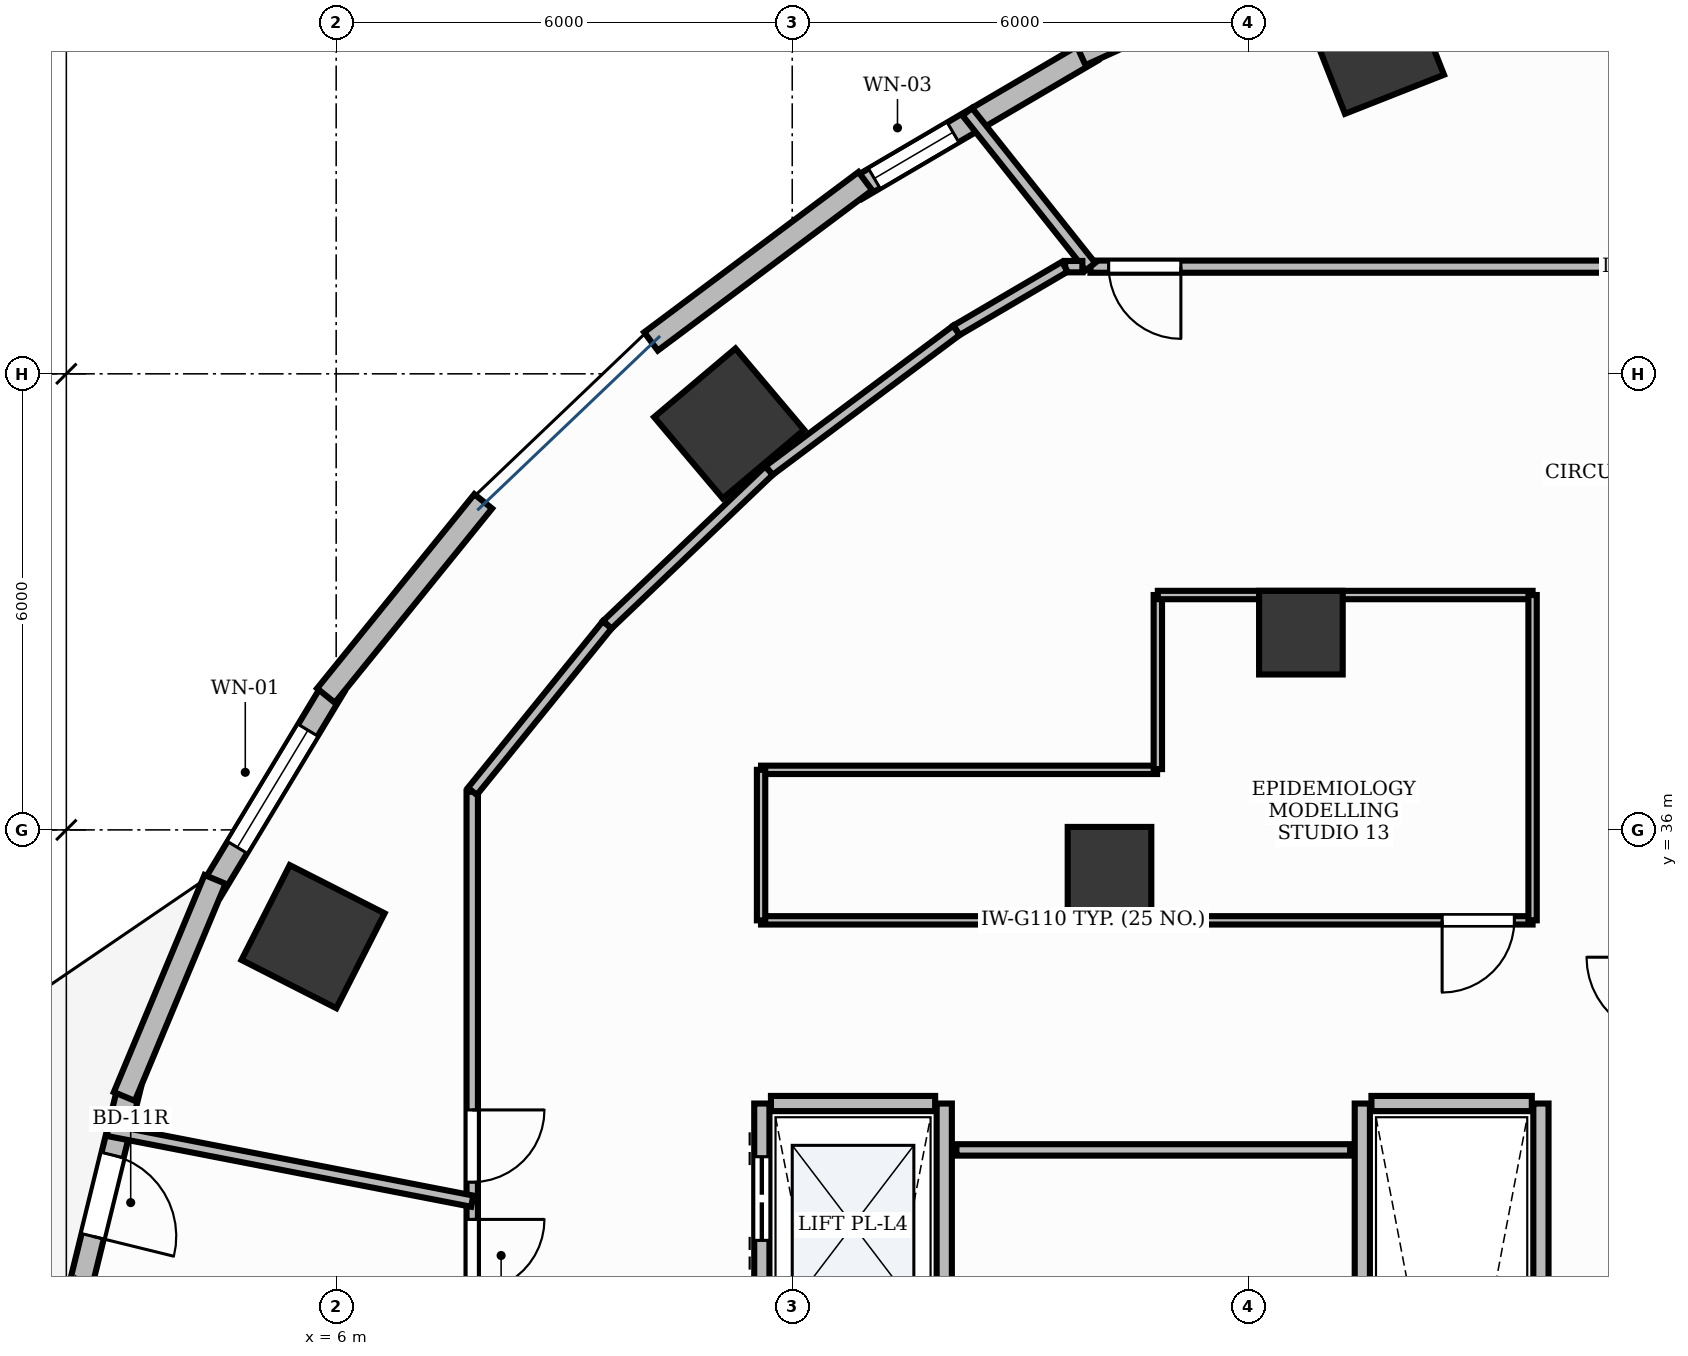
"""IFC4 building model, lengths in metres.
Left out: names, types, materials, properties, quantities, classifications, styles, units other than length and angle.
Written with IfcOpenShell. Run it as: python <this file> out.ifc"""

import sys

from ifc_helpers import new_model, si_unit, direction, frame, frame_2d, origin, origin_2d, place, context, subcontext, project, spatial, rectangle, extrude, element, fill, save


model = new_model("IFC4")
c1 = context("Model", 3, precision=1e-05, world=origin(), true_north=direction((0.0, 1.0)))
c2 = subcontext(c1, "Body", "Model", "MODEL_VIEW")
j1 = project(units=[si_unit("LENGTHUNIT", "METRE"), si_unit("PLANEANGLEUNIT", "RADIAN")], contexts=[c1])
p1 = place(None, origin())
s1 = spatial("IfcSite", under=j1, at=p1, CompositionType="ELEMENT")
p2 = place(p1, origin())
s2 = spatial("IfcBuilding", under=s1, at=p2, CompositionType="ELEMENT")
p3 = place(p2, frame((0.0, 0.0, 76.2)))
s3 = spatial("IfcBuildingStorey", under=s2, at=p3, CompositionType="ELEMENT", Elevation=76.2)
for number, where, z_axis, x_axis in (
    (1, (19.667, 46.329, -0.0), (0.0, 0.0, 1.0), (0.93, 0.367, 0.0)),
    (2, (11.17, 41.347, -0.0), (0.0, 0.0, 1.0), (0.764, 0.645, 0.0)),
):
    element("IfcColumn", number, at=place(p3, frame(where, z_axis=z_axis, x_axis=x_axis)), inside=s3, PredefinedType="COLUMN", context=c2, shape_type="SweptSolid", body=[
        extrude(rectangle(XDim=1.4, YDim=1.4, at=origin_2d()), origin(), (0.0, 0.0, 1.0), 3.901),
    ])
p4 = place(p3, frame((18.692, 38.595, -0.0), z_axis=(0.0, 0.0, 1.0), x_axis=(1.0, 0.0, 0.0)))
e3 = element("IfcColumn", 3, at=p4, inside=s3, PredefinedType="COLUMN", context=c2, shape_type="SweptSolid", body=[
    extrude(rectangle(XDim=1.1, YDim=1.1, at=origin_2d()), origin(), (0.0, 0.0, 1.0), 3.901),
])
p5 = place(p3, frame((5.696, 34.596, -0.0), z_axis=(0.0, 0.0, 1.0), x_axis=(0.453057191132, 0.891481453292, 0.0)))
e4 = element("IfcColumn", 4, at=p5, inside=s3, PredefinedType="COLUMN", context=c2, shape_type="SweptSolid", body=[
    extrude(rectangle(XDim=1.4, YDim=1.4, at=origin_2d()), origin(), (0.0, 0.0, 1.0), 3.901),
])
p6 = place(p3, frame((16.174, 35.489, -0.0), z_axis=(0.0, 0.0, 1.0), x_axis=(1.0, 0.0, 0.0)))
e5 = element("IfcColumn", 5, at=p6, inside=s3, PredefinedType="COLUMN", context=c2, shape_type="SweptSolid", body=[
    extrude(rectangle(XDim=1.1, YDim=1.1, at=origin_2d()), origin(), (0.0, 0.0, 1.0), 3.901),
])
p7 = place(p3, frame((15.944, 46.25, 0.0), z_axis=(0.0, 0.0, 1.0), x_axis=(-0.862473134325, -0.506102847817, 0.0)))
e6 = element("IfcWall", 6, at=p7, inside=s3, PredefinedType="STANDARD", context=c2, shape_type="SweptSolid", body=[
    extrude(rectangle(XDim=3.595, YDim=0.3, at=frame_2d((1.798, 0.0))), origin(), (0.0, 0.0, 1.0), 3.9),
])
p8 = place(p7, frame((2.12, 0.0, 0.9)))
e7 = element("IfcOpeningElement", 7, at=p8, cuts=e6, PredefinedType="OPENING", context=c2, shape_type="SweptSolid", body=[
    extrude(rectangle(XDim=1.2, YDim=2.7, at=frame_2d((0.6, 1.35))), frame((0.0, 0.165, 0.0), z_axis=(0.0, -1.0, 0.0), x_axis=(1.0, 0.0, 0.0)), (0.0, 0.0, 1.0), 0.33),
])
p9 = place(p3, frame((5.975, 37.886, 0.0), z_axis=(0.0, 0.0, 1.0), x_axis=(-0.516447962267, -0.856318575222, 0.0)))
e8 = element("IfcWall", 8, at=p9, inside=s3, PredefinedType="STANDARD", context=c2, shape_type="SweptSolid", body=[
    extrude(rectangle(XDim=3.143, YDim=0.3, at=frame_2d((1.571, 0.0))), origin(), (0.0, 0.0, 1.0), 3.47),
])
p10 = place(p9, frame((0.671, 0.0, 0.9)))
e9 = element("IfcOpeningElement", 9, at=p10, cuts=e8, PredefinedType="OPENING", context=c2, shape_type="SweptSolid", body=[
    extrude(rectangle(XDim=1.8, YDim=2.1, at=frame_2d((0.9, 1.05))), frame((0.0, 0.165, 0.0), z_axis=(0.0, -1.0, 0.0), x_axis=(1.0, 0.0, 0.0)), (0.0, 0.0, 1.0), 0.33),
])
p11 = place(p3, frame((3.285, 32.641, 0.0), z_axis=(0.0, 0.0, 1.0), x_axis=(-0.238522035896, -0.971137085273, 0.0)))
e10 = element("IfcWall", 10, at=p11, inside=s3, PredefinedType="STANDARD", context=c2, shape_type="SweptSolid", body=[
    extrude(rectangle(XDim=2.993, YDim=0.3, at=frame_2d((1.497, 0.0))), origin(), (0.0, 0.0, 1.0), 3.9),
])
p12 = place(p11, frame((0.946, 0.0, 0.0)))
e11 = element("IfcOpeningElement", 11, at=p12, cuts=e10, PredefinedType="OPENING", context=c2, shape_type="SweptSolid", body=[
    extrude(rectangle(XDim=1.1, YDim=2.15, at=frame_2d((0.55, 1.075))), frame((0.0, 0.165, 0.0), z_axis=(0.0, -1.0, 0.0), x_axis=(1.0, 0.0, 0.0)), (0.0, 0.0, 1.0), 0.33),
])
p13 = place(p3, frame((19.201, 47.743, 0.0), z_axis=(0.0, 0.0, 1.0), x_axis=(-0.910623406862, -0.413237233166, 0.0)))
e12 = element("IfcWall", 12, at=p13, inside=s3, PredefinedType="STANDARD", context=c2, shape_type="SweptSolid", body=[
    extrude(rectangle(XDim=3.74, YDim=0.3, at=frame_2d((1.87, 0.0))), origin(), (0.0, 0.0, 1.0), 3.9),
])
p14 = place(p3, frame((12.961, 44.535, 0.0), z_axis=(0.0, 0.0, 1.0), x_axis=(-0.800823020995, -0.598901067827, 0.0)))
e13 = element("IfcWall", 13, at=p14, inside=s3, PredefinedType="STANDARD", context=c2, shape_type="SweptSolid", body=[
    extrude(rectangle(XDim=3.521, YDim=0.3, at=frame_2d((1.76, 0.0))), origin(), (0.0, 0.0, 1.0), 3.9),
])
p15 = place(p3, frame((7.934, 40.323, 0.0), z_axis=(0.0, 0.0, 1.0), x_axis=(-0.629221727718, -0.777225847079, 0.0)))
e14 = element("IfcWall", 14, at=p15, inside=s3, PredefinedType="STANDARD", context=c2, shape_type="SweptSolid", body=[
    extrude(rectangle(XDim=3.288, YDim=0.3, at=frame_2d((1.644, 0.0))), origin(), (0.0, 0.0, 1.0), 3.47),
])
p16 = place(p3, frame((4.406, 35.349, 0.0), z_axis=(0.0, 0.0, 1.0), x_axis=(-0.38535448421, -0.922768617531, 0.0)))
e15 = element("IfcWall", 15, at=p16, inside=s3, PredefinedType="STANDARD", context=c2, shape_type="SweptSolid", body=[
    extrude(rectangle(XDim=3.095, YDim=0.3, at=frame_2d((1.548, 0.0))), origin(), (0.0, 0.0, 1.0), 3.9),
])
p17 = place(p3, frame((11.6, 21.6, 0.0), z_axis=(0.0, 0.0, 1.0), x_axis=(0.0, 1.0, 0.0)))
e16 = element("IfcWall", 16, at=p17, inside=s3, PredefinedType="PARTITIONING", context=c2, shape_type="SweptSolid", body=[
    extrude(rectangle(XDim=10.8, YDim=0.2, at=frame_2d((5.4, 0.0))), origin(), (0.0, 0.0, 1.0), 2.91),
])
p18 = place(p17, frame((0.9, 0.0, 0.0)))
e17 = element("IfcOpeningElement", 17, at=p18, cuts=e16, PredefinedType="OPENING", context=c2, shape_type="SweptSolid", body=[
    extrude(rectangle(XDim=1.1, YDim=2.2, at=frame_2d((0.55, 1.1))), frame((0.0, 0.115, 0.0), z_axis=(0.0, -1.0, 0.0), x_axis=(1.0, 0.0, 0.0)), (0.0, 0.0, 1.0), 0.23),
])
p19 = place(p17, frame((3.6, 0.0, 0.0)))
e18 = element("IfcOpeningElement", 18, at=p19, cuts=e16, PredefinedType="OPENING", context=c2, shape_type="SweptSolid", body=[
    extrude(rectangle(XDim=1.1, YDim=2.2, at=frame_2d((0.55, 1.1))), frame((0.0, 0.115, 0.0), z_axis=(0.0, -1.0, 0.0), x_axis=(1.0, 0.0, 0.0)), (0.0, 0.0, 1.0), 0.23),
])
p20 = place(p17, frame((6.3, 0.0, 0.0)))
e19 = element("IfcOpeningElement", 19, at=p20, cuts=e16, PredefinedType="OPENING", context=c2, shape_type="SweptSolid", body=[
    extrude(rectangle(XDim=1.1, YDim=2.2, at=frame_2d((0.55, 1.1))), frame((0.0, 0.115, 0.0), z_axis=(0.0, -1.0, 0.0), x_axis=(1.0, 0.0, 0.0)), (0.0, 0.0, 1.0), 0.23),
])
p21 = place(p17, frame((9.0, 0.0, 0.0)))
e20 = element("IfcOpeningElement", 20, at=p21, cuts=e16, PredefinedType="OPENING", context=c2, shape_type="SweptSolid", body=[
    extrude(rectangle(XDim=1.1, YDim=2.2, at=frame_2d((0.55, 1.1))), frame((0.0, 0.115, 0.0), z_axis=(0.0, -1.0, 0.0), x_axis=(1.0, 0.0, 0.0)), (0.0, 0.0, 1.0), 0.23),
])
p22 = place(p3, frame((14.0, 21.6, 0.0), z_axis=(0.0, 0.0, 1.0), x_axis=(0.0, 1.0, 0.0)))
e21 = element("IfcWall", 21, at=p22, inside=s3, PredefinedType="PARTITIONING", context=c2, shape_type="SweptSolid", body=[
    extrude(rectangle(XDim=10.8, YDim=0.2, at=frame_2d((5.4, 0.0))), origin(), (0.0, 0.0, 1.0), 2.91),
])
p23 = place(p3, frame((11.72, 32.4, 0.0), z_axis=(0.0, 0.0, 1.0), x_axis=(1.0, 0.0, 0.0)))
e22 = element("IfcWall", 22, at=p23, inside=s3, PredefinedType="PARTITIONING", context=c2, shape_type="SweptSolid", body=[
    extrude(rectangle(XDim=2.16, YDim=0.2, at=frame_2d((1.08, 0.0))), origin(), (0.0, 0.0, 1.0), 2.91),
])
for number, where, z_axis, x_axis in (
    (23, (19.5, 21.6, 0.0), (0.0, 0.0, 1.0), (0.0, 1.0, 0.0)),
    (24, (21.85, 21.6, 0.0), (0.0, 0.0, 1.0), (0.0, 1.0, 0.0)),
):
    element("IfcWall", number, at=place(p3, frame(where, z_axis=z_axis, x_axis=x_axis)), inside=s3, PredefinedType="PARTITIONING", context=c2, shape_type="SweptSolid", body=[
        extrude(rectangle(XDim=10.8, YDim=0.2, at=frame_2d((5.4, 0.0))), origin(), (0.0, 0.0, 1.0), 2.91),
    ])
p24 = place(p3, frame((19.62, 32.4, 0.0), z_axis=(0.0, 0.0, 1.0), x_axis=(1.0, 0.0, 0.0)))
e25 = element("IfcWall", 25, at=p24, inside=s3, PredefinedType="PARTITIONING", context=c2, shape_type="SweptSolid", body=[
    extrude(rectangle(XDim=2.11, YDim=0.2, at=frame_2d((1.055, 0.0))), origin(), (0.0, 0.0, 1.0), 2.91),
])
p25 = place(p3, frame((7.79, 31.115, 0.0), z_axis=(0.0, 0.0, 1.0), x_axis=(0.0, -1.0, 0.0)))
e26 = element("IfcWall", 26, at=p25, inside=s3, PredefinedType="PARTITIONING", context=c2, shape_type="SweptSolid", body=[
    extrude(rectangle(XDim=13.617, YDim=0.15, at=frame_2d((6.808, 0.0))), origin(), (0.0, 0.0, 1.0), 2.91),
])
p26 = place(p25, frame((0.24, 0.0, 0.0)))
e27 = element("IfcOpeningElement", 27, at=p26, cuts=e26, PredefinedType="OPENING", context=c2, shape_type="SweptSolid", body=[
    extrude(rectangle(XDim=0.95, YDim=2.15, at=frame_2d((0.475, 1.075))), frame((0.0, 0.09, 0.0), z_axis=(0.0, -1.0, 0.0), x_axis=(1.0, 0.0, 0.0)), (0.0, 0.0, 1.0), 0.18),
])
p27 = place(p3, frame((30.922, 43.41, 0.0), z_axis=(0.0, 0.0, 1.0), x_axis=(-1.0, 0.0, 0.0)))
e28 = element("IfcWall", 28, at=p27, inside=s3, PredefinedType="PARTITIONING", context=c2, shape_type="SweptSolid", body=[
    extrude(rectangle(XDim=14.999, YDim=0.16, at=frame_2d((7.5, 0.0))), origin(), (0.0, 0.0, 1.0), 2.91),
])
p28 = place(p27, frame((13.809, 0.0, 0.0)))
e29 = element("IfcOpeningElement", 29, at=p28, cuts=e28, PredefinedType="OPENING", context=c2, shape_type="SweptSolid", body=[
    extrude(rectangle(XDim=0.95, YDim=2.15, at=frame_2d((0.475, 1.075))), frame((0.0, 0.095, 0.0), z_axis=(0.0, -1.0, 0.0), x_axis=(1.0, 0.0, 0.0)), (0.0, 0.0, 1.0), 0.19),
])
p29 = place(p3, frame((21.74, 34.81, 0.0), z_axis=(0.0, 0.0, 1.0), x_axis=(-1.0, 0.0, 0.0)))
e30 = element("IfcWall", 30, at=p29, inside=s3, PredefinedType="MOVABLE", context=c2, shape_type="SweptSolid", body=[
    extrude(rectangle(XDim=10.15, YDim=0.11, at=frame_2d((5.075, 0.0))), origin(), (0.0, 0.0, 1.0), 2.91),
])
p30 = place(p29, frame((0.24, 0.0, 0.0)))
e31 = element("IfcOpeningElement", 31, at=p30, cuts=e30, PredefinedType="OPENING", context=c2, shape_type="SweptSolid", body=[
    extrude(rectangle(XDim=0.95, YDim=2.15, at=frame_2d((0.475, 1.075))), frame((0.0, 0.07, 0.0), z_axis=(0.0, -1.0, 0.0), x_axis=(1.0, 0.0, 0.0)), (0.0, 0.0, 1.0), 0.14),
])
p31 = place(p3, frame((7.79, 36.501, 0.0), z_axis=(0.0, 0.0, 1.0), x_axis=(0.0, -1.0, 0.0)))
e32 = element("IfcWall", 32, at=p31, inside=s3, PredefinedType="PARTITIONING", context=c2, shape_type="SweptSolid", body=[
    extrude(rectangle(XDim=5.375, YDim=0.15, at=frame_2d((2.688, 0.0))), origin(), (0.0, 0.0, 1.0), 2.91),
])
p32 = place(p31, frame((4.185, 0.0, 0.0)))
e33 = element("IfcOpeningElement", 33, at=p32, cuts=e32, PredefinedType="OPENING", context=c2, shape_type="SweptSolid", body=[
    extrude(rectangle(XDim=0.95, YDim=2.15, at=frame_2d((0.475, 1.075))), frame((0.0, 0.09, 0.0), z_axis=(0.0, -1.0, 0.0), x_axis=(1.0, 0.0, 0.0)), (0.0, 0.0, 1.0), 0.18),
])
p33 = place(p3, frame((14.16, 31.79, 0.0), z_axis=(0.0, 0.0, 1.0), x_axis=(1.0, 0.0, 0.0)))
e34 = element("IfcWall", 34, at=p33, inside=s3, PredefinedType="PARTITIONING", context=c2, shape_type="SweptSolid", body=[
    extrude(rectangle(XDim=5.18, YDim=0.15, at=frame_2d((2.59, 0.0))), origin(), (0.0, 0.0, 1.0), 2.91),
])
p34 = place(p3, frame((2.995, 32.048, 0.0), z_axis=(0.0, 0.0, 1.0), x_axis=(0.981623712682, -0.190826850052, 0.0)))
e35 = element("IfcWall", 35, at=p34, inside=s3, PredefinedType="PARTITIONING", context=c2, shape_type="SweptSolid", body=[
    extrude(rectangle(XDim=4.885, YDim=0.15, at=frame_2d((2.442, 0.0))), origin(), (0.0, 0.0, 1.0), 2.91),
])
p35 = place(p3, frame((15.923, 43.41, 0.0), z_axis=(0.0, 0.0, 1.0), x_axis=(-0.622507898818, 0.782613516309, 0.0)))
e36 = element("IfcWall", 36, at=p35, inside=s3, PredefinedType="PARTITIONING", context=c2, shape_type="SweptSolid", body=[
    extrude(rectangle(XDim=2.603, YDim=0.16, at=frame_2d((1.302, 0.0))), origin(), (0.0, 0.0, 1.0), 2.91),
])
p36 = place(p3, frame((11.59, 36.79, 0.0), z_axis=(0.0, 0.0, 1.0), x_axis=(1.0, 0.0, 0.0)))
e37 = element("IfcWall", 37, at=p36, inside=s3, PredefinedType="MOVABLE", context=c2, shape_type="SweptSolid", body=[
    extrude(rectangle(XDim=5.21, YDim=0.11, at=frame_2d((2.605, 0.0))), origin(), (0.0, 0.0, 1.0), 2.91),
])
p37 = place(p3, frame((16.81, 36.8, 0.0), z_axis=(0.0, 0.0, 1.0), x_axis=(0.0, 1.0, 0.0)))
e38 = element("IfcWall", 38, at=p37, inside=s3, PredefinedType="MOVABLE", context=c2, shape_type="SweptSolid", body=[
    extrude(rectangle(XDim=2.29, YDim=0.11, at=frame_2d((1.145, 0.0))), origin(), (0.0, 0.0, 1.0), 2.91),
])
p38 = place(p3, frame((16.81, 39.09, 0.0), z_axis=(0.0, 0.0, 1.0), x_axis=(1.0, 0.0, 0.0)))
e39 = element("IfcWall", 39, at=p38, inside=s3, PredefinedType="MOVABLE", context=c2, shape_type="SweptSolid", body=[
    extrude(rectangle(XDim=4.93, YDim=0.11, at=frame_2d((2.465, 0.0))), origin(), (0.0, 0.0, 1.0), 2.91),
])
p39 = place(p3, frame((21.74, 39.09, 0.0), z_axis=(0.0, 0.0, 1.0), x_axis=(0.0, -1.0, 0.0)))
e40 = element("IfcWall", 40, at=p39, inside=s3, PredefinedType="MOVABLE", context=c2, shape_type="SweptSolid", body=[
    extrude(rectangle(XDim=4.28, YDim=0.11, at=frame_2d((2.14, 0.0))), origin(), (0.0, 0.0, 1.0), 2.91),
])
p40 = place(p3, frame((11.59, 34.81, 0.0), z_axis=(0.0, 0.0, 1.0), x_axis=(0.0, 1.0, 0.0)))
e41 = element("IfcWall", 41, at=p40, inside=s3, PredefinedType="MOVABLE", context=c2, shape_type="SweptSolid", body=[
    extrude(rectangle(XDim=1.98, YDim=0.11, at=frame_2d((0.99, 0.0))), origin(), (0.0, 0.0, 1.0), 2.91),
])
p41 = place(p3, frame((15.817, 43.41, 0.0), z_axis=(0.0, 0.0, 1.0), x_axis=(-1.0, 0.0, 0.0)))
e42 = element("IfcWall", 42, at=p41, inside=s3, PredefinedType="PARTITIONING", context=c2, shape_type="SweptSolid", body=[
    extrude(rectangle(XDim=0.226, YDim=0.15, at=frame_2d((0.113, 0.0))), origin(), (0.0, 0.0, 1.0), 2.91),
])
p42 = place(p3, frame((15.586, 43.409, 0.0), z_axis=(0.0, 0.0, 1.0), x_axis=(-0.862446636904, -0.506148000582, 0.0)))
e43 = element("IfcWall", 43, at=p42, inside=s3, PredefinedType="PARTITIONING", context=c2, shape_type="SweptSolid", body=[
    extrude(rectangle(XDim=1.652, YDim=0.15, at=frame_2d((0.826, 0.0))), origin(), (0.0, 0.0, 1.0), 2.91),
])
p43 = place(p3, frame((14.16, 42.572, 0.0), z_axis=(0.0, 0.0, 1.0), x_axis=(-0.800808090092, -0.598921032227, 0.0)))
e44 = element("IfcWall", 44, at=p43, inside=s3, PredefinedType="PARTITIONING", context=c2, shape_type="SweptSolid", body=[
    extrude(rectangle(XDim=3.079, YDim=0.15, at=frame_2d((1.54, 0.0))), origin(), (0.0, 0.0, 1.0), 2.91),
])
p44 = place(p3, frame((11.693, 40.727, 0.0), z_axis=(0.0, 0.0, 1.0), x_axis=(-0.723683526017, -0.690131983154, 0.0)))
e45 = element("IfcWall", 45, at=p44, inside=s3, PredefinedType="PARTITIONING", context=c2, shape_type="SweptSolid", body=[
    extrude(rectangle(XDim=2.94, YDim=0.15, at=frame_2d((1.47, 0.0))), origin(), (0.0, 0.0, 1.0), 2.91),
])
p45 = place(p3, frame((9.565, 38.697, 0.0), z_axis=(0.0, 0.0, 1.0), x_axis=(-0.629270515505, -0.777186347227, 0.0)))
e46 = element("IfcWall", 46, at=p45, inside=s3, PredefinedType="PARTITIONING", context=c2, shape_type="SweptSolid", body=[
    extrude(rectangle(XDim=2.817, YDim=0.15, at=frame_2d((1.409, 0.0))), origin(), (0.0, 0.0, 1.0), 2.91),
])
p46 = place(p8, origin())
e47 = element("IfcWindow", 47, at=p46, inside=s3, PartitioningType="SINGLE_PANEL", PredefinedType="WINDOW", context=c2, shape_type="SweptSolid", body=[
    extrude(rectangle(XDim=1.2, YDim=2.7, at=frame_2d((0.6, 1.35))), frame((0.0, 0.03, 0.0), z_axis=(0.0, -1.0, 0.0), x_axis=(1.0, 0.0, 0.0)), (0.0, 0.0, 1.0), 0.06),
])
fill(e7, e47)
p47 = place(p10, origin())
e48 = element("IfcWindow", 48, at=p47, inside=s3, PartitioningType="SINGLE_PANEL", PredefinedType="WINDOW", context=c2, shape_type="SweptSolid", body=[
    extrude(rectangle(XDim=1.8, YDim=2.1, at=frame_2d((0.9, 1.05))), frame((0.0, 0.03, 0.0), z_axis=(0.0, -1.0, 0.0), x_axis=(1.0, 0.0, 0.0)), (0.0, 0.0, 1.0), 0.06),
])
fill(e9, e48)
p48 = place(p12, origin())
e49 = element("IfcDoor", 49, at=p48, inside=s3, OperationType="SINGLE_SWING_RIGHT", PredefinedType="DOOR", context=c2, shape_type="SweptSolid", body=[
    extrude(rectangle(XDim=1.1, YDim=2.15, at=frame_2d((0.55, 1.075))), frame((0.0, 0.025, 0.0), z_axis=(0.0, -1.0, 0.0), x_axis=(1.0, 0.0, 0.0)), (0.0, 0.0, 1.0), 0.05),
])
fill(e11, e49)
p49 = place(p21, origin())
e50 = element("IfcDoor", 50, at=p49, inside=s3, OperationType="DOUBLE_DOOR_SLIDING", PredefinedType="DOOR", context=c2, shape_type="SweptSolid", body=[
    extrude(rectangle(XDim=1.1, YDim=2.2, at=frame_2d((0.55, 1.1))), frame((0.0, 0.025, 0.0), z_axis=(0.0, -1.0, 0.0), x_axis=(1.0, 0.0, 0.0)), (0.0, 0.0, 1.0), 0.05),
])
fill(e20, e50)
p50 = place(p26, origin())
e51 = element("IfcDoor", 51, at=p50, inside=s3, OperationType="SINGLE_SWING_LEFT", PredefinedType="DOOR", context=c2, shape_type="SweptSolid", body=[
    extrude(rectangle(XDim=0.95, YDim=2.15, at=frame_2d((0.475, 1.075))), frame((0.0, 0.025, 0.0), z_axis=(0.0, -1.0, 0.0), x_axis=(1.0, 0.0, 0.0)), (0.0, 0.0, 1.0), 0.05),
])
fill(e27, e51)
p51 = place(p28, origin())
e52 = element("IfcDoor", 52, at=p51, inside=s3, OperationType="SINGLE_SWING_LEFT", PredefinedType="DOOR", context=c2, shape_type="SweptSolid", body=[
    extrude(rectangle(XDim=0.95, YDim=2.15, at=frame_2d((0.475, 1.075))), frame((0.0, 0.025, 0.0), z_axis=(0.0, -1.0, 0.0), x_axis=(1.0, 0.0, 0.0)), (0.0, 0.0, 1.0), 0.05),
])
fill(e29, e52)
p52 = place(p30, origin())
e53 = element("IfcDoor", 53, at=p52, inside=s3, OperationType="SINGLE_SWING_RIGHT", PredefinedType="DOOR", context=c2, shape_type="SweptSolid", body=[
    extrude(rectangle(XDim=0.95, YDim=2.15, at=frame_2d((0.475, 1.075))), frame((0.0, 0.025, 0.0), z_axis=(0.0, -1.0, 0.0), x_axis=(1.0, 0.0, 0.0)), (0.0, 0.0, 1.0), 0.05),
])
fill(e31, e53)
p53 = place(p32, origin())
e54 = element("IfcDoor", 54, at=p53, inside=s3, OperationType="SINGLE_SWING_LEFT", PredefinedType="DOOR", context=c2, shape_type="SweptSolid", body=[
    extrude(rectangle(XDim=0.95, YDim=2.15, at=frame_2d((0.475, 1.075))), frame((0.0, 0.025, 0.0), z_axis=(0.0, -1.0, 0.0), x_axis=(1.0, 0.0, 0.0)), (0.0, 0.0, 1.0), 0.05),
])
fill(e33, e54)
save(model, sys.argv[1])
